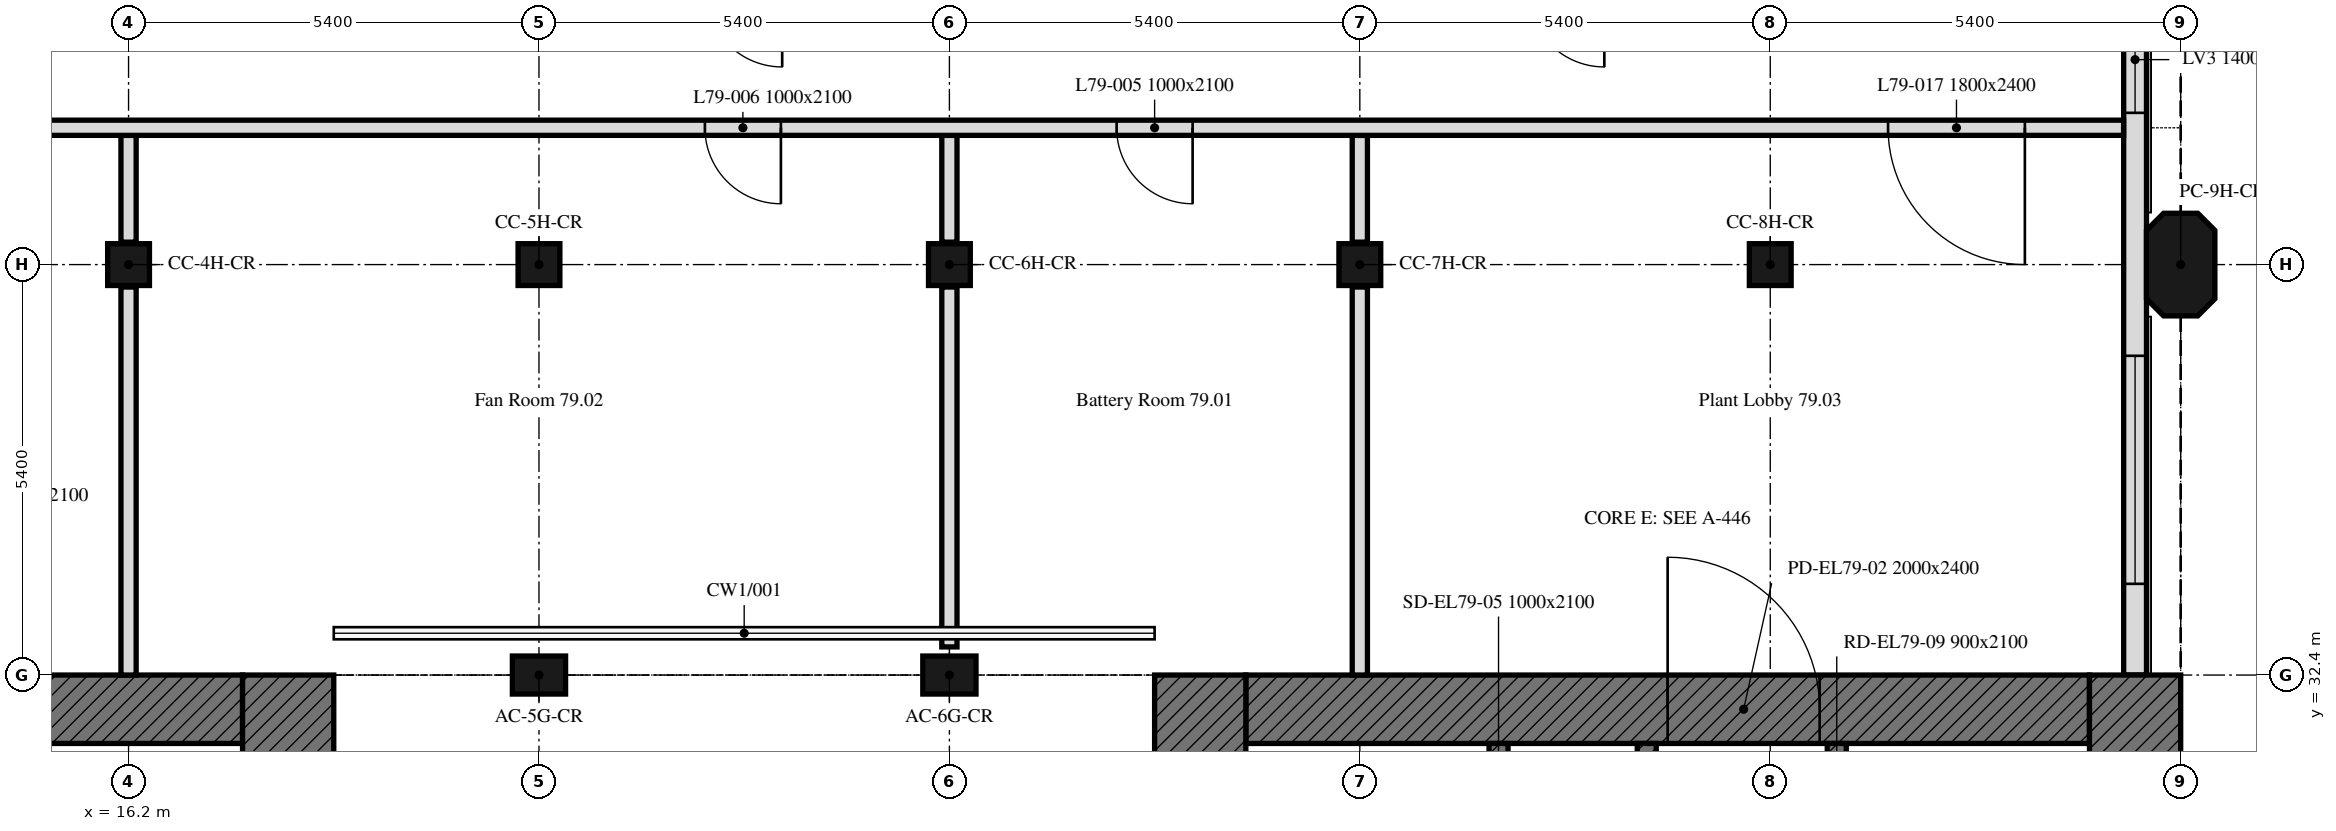
"""IFC4 building model, lengths in metres.
Left out: names, types, materials, properties, quantities, classifications, styles, units other than length and angle.
Written with IfcOpenShell. Run it as: python <this file> out.ifc"""

import sys

from ifc_helpers import new_model, si_unit, direction, frame, frame_2d, origin, origin_2d, place, context, subcontext, project, spatial, polyline, rectangle, outline, extrude, element, fill, save


model = new_model("IFC4")
c1 = context("Model", 3, precision=1e-05, world=origin(), true_north=direction((0.0, 1.0)))
c2 = subcontext(c1, "Body", "Model", "MODEL_VIEW")
j1 = project(units=[si_unit("LENGTHUNIT", "METRE"), si_unit("PLANEANGLEUNIT", "RADIAN")], contexts=[c1])
p1 = place(None, origin())
s1 = spatial("IfcSite", under=j1, at=p1, CompositionType="ELEMENT")
p2 = place(p1, origin())
s2 = spatial("IfcBuilding", under=s1, at=p2, CompositionType="ELEMENT")
p3 = place(p2, frame((0.0, 0.0, 317.2)))
s3 = spatial("IfcBuildingStorey", under=s2, at=p3, CompositionType="ELEMENT", Elevation=317.2)
for number, where, z_axis, x_axis in (
    (1, (21.6, 32.4, 0.0), (0.0, 0.0, 1.0), (1.0, 0.0, 0.0)),
    (2, (27.0, 32.4, 0.0), (0.0, 0.0, 1.0), (1.0, 0.0, 0.0)),
):
    element("IfcColumn", number, at=place(p3, frame(where, z_axis=z_axis, x_axis=x_axis)), inside=s3, PredefinedType="COLUMN", context=c2, shape_type="SweptSolid", body=[
        extrude(rectangle(XDim=0.7, YDim=0.5, at=origin_2d()), origin(), (0.0, 0.0, 1.0), 4.2),
    ])
for number, where, z_axis, x_axis in (
    (3, (16.2, 37.8, 0.0), (0.0, 0.0, 1.0), (1.0, 0.0, 0.0)),
    (4, (21.6, 37.8, 0.0), (0.0, 0.0, 1.0), (1.0, 0.0, 0.0)),
    (5, (27.0, 37.8, 0.0), (0.0, 0.0, 1.0), (1.0, 0.0, 0.0)),
    (6, (32.4, 37.8, 0.0), (0.0, 0.0, 1.0), (1.0, 0.0, 0.0)),
    (7, (37.8, 37.8, 0.0), (0.0, 0.0, 1.0), (1.0, 0.0, 0.0)),
):
    element("IfcColumn", number, at=place(p3, frame(where, z_axis=z_axis, x_axis=x_axis)), inside=s3, PredefinedType="COLUMN", context=c2, shape_type="SweptSolid", body=[
        extrude(rectangle(XDim=0.55, YDim=0.55, at=origin_2d()), origin(), (0.0, 0.0, 1.0), 4.2),
    ])
p4 = place(p3, frame((43.2, 37.8, 0.0), z_axis=(0.0, 0.0, 1.0), x_axis=(0.0, 1.0, 0.0)))
e8 = element("IfcColumn", 8, at=p4, inside=s3, PredefinedType="COLUMN", context=c2, shape_type="SweptSolid", body=[
    extrude(outline(polyline([(-0.45, -0.45), (0.45, -0.45), (0.675, -0.225), (0.675, 0.225), (0.45, 0.45), (-0.45, 0.45), (-0.675, 0.225), (-0.675, -0.225), (-0.45, -0.45)])), origin(), (0.0, 0.0, 1.0), 4.2),
])
p5 = place(p3, frame((42.6, 32.4, 0.0), z_axis=(0.0, 0.0, 1.0), x_axis=(0.0, 1.0, 0.0)))
e9 = element("IfcWall", 9, at=p5, inside=s3, PredefinedType="SOLIDWALL", context=c2, shape_type="SweptSolid", body=[
    extrude(outline(polyline([(0.0, 0.0), (10.614, 0.0), (10.614, 4.2), (10.024, 4.2), (9.434, 4.2), (8.845, 4.2), (8.255, 4.2), (7.665, 4.2), (7.076, 4.2), (6.486, 4.2), (5.896, 4.2), (5.307, 4.2), (4.717, 4.2), (4.127, 4.2), (3.538, 4.2), (2.948, 4.2), (2.359, 4.2), (1.769, 4.2), (1.179, 4.2), (0.59, 4.2), (0.0, 4.2), (0.0, 0.0)])), frame((0.0, 0.15, 0.0), z_axis=(0.0, -1.0, 0.0), x_axis=(1.0, 0.0, 0.0)), (0.0, 0.0, 1.0), 0.3),
])
p6 = place(p5, frame((1.2, 0.0, 0.6)))
e10 = element("IfcOpeningElement", 10, at=p6, cuts=e9, PredefinedType="OPENING", context=c2, shape_type="SweptSolid", body=[
    extrude(rectangle(XDim=3.0, YDim=1.8, at=frame_2d((1.5, 0.9))), frame((0.0, 0.16, 0.0), z_axis=(0.0, -1.0, 0.0), x_axis=(1.0, 0.0, 0.0)), (0.0, 0.0, 1.0), 0.32),
])
p7 = place(p5, frame((7.396, 0.0, 0.6)))
e11 = element("IfcOpeningElement", 11, at=p7, cuts=e9, PredefinedType="OPENING", context=c2, shape_type="SweptSolid", body=[
    extrude(rectangle(XDim=1.4, YDim=1.8, at=frame_2d((0.7, 0.9))), frame((0.0, 0.16, 0.0), z_axis=(0.0, -1.0, 0.0), x_axis=(1.0, 0.0, 0.0)), (0.0, 0.0, 1.0), 0.32),
])
p8 = place(p3, frame((6.6, 31.95, 0.0), z_axis=(0.0, 0.0, 1.0), x_axis=(1.0, 0.0, 0.0)))
e12 = element("IfcWall", 12, at=p8, inside=s3, PredefinedType="SOLIDWALL", context=c2, shape_type="SweptSolid", body=[
    extrude(rectangle(XDim=11.1, YDim=0.9, at=frame_2d((5.55, 0.0))), origin(), (0.0, 0.0, 1.0), 4.2),
])
p9 = place(p8, frame((3.55, 0.0, 0.0)))
e13 = element("IfcOpeningElement", 13, at=p9, cuts=e12, PredefinedType="OPENING", context=c2, shape_type="SweptSolid", body=[
    extrude(rectangle(XDim=2.0, YDim=2.4, at=frame_2d((1.0, 1.2))), frame((0.0, 0.45, 0.0), z_axis=(0.0, -1.0, 0.0), x_axis=(1.0, 0.0, 0.0)), (0.0, 0.0, 1.0), 0.9),
])
p10 = place(p3, frame((18.3, 32.4, 0.0), z_axis=(0.0, 0.0, 1.0), x_axis=(0.0, -1.0, 0.0)))
e14 = element("IfcWall", 14, at=p10, inside=s3, PredefinedType="SOLIDWALL", context=c2, shape_type="SweptSolid", body=[
    extrude(rectangle(XDim=16.2, YDim=1.2, at=frame_2d((8.1, 0.0))), origin(), (0.0, 0.0, 1.0), 4.2),
])
p11 = place(p3, frame((30.9, 31.95, 0.0), z_axis=(0.0, 0.0, 1.0), x_axis=(1.0, 0.0, 0.0)))
e15 = element("IfcWall", 15, at=p11, inside=s3, PredefinedType="SOLIDWALL", context=c2, shape_type="SweptSolid", body=[
    extrude(rectangle(XDim=11.1, YDim=0.9, at=frame_2d((5.55, 0.0))), origin(), (0.0, 0.0, 1.0), 4.2),
])
p12 = place(p11, frame((5.55, 0.0, 0.0)))
e16 = element("IfcOpeningElement", 16, at=p12, cuts=e15, PredefinedType="OPENING", context=c2, shape_type="SweptSolid", body=[
    extrude(rectangle(XDim=2.0, YDim=2.4, at=frame_2d((1.0, 1.2))), frame((0.0, 0.45, 0.0), z_axis=(0.0, -1.0, 0.0), x_axis=(1.0, 0.0, 0.0)), (0.0, 0.0, 1.0), 0.9),
])
for number, where, z_axis, x_axis in (
    (17, (42.6, 32.4, 0.0), (0.0, 0.0, 1.0), (0.0, -1.0, 0.0)),
    (18, (30.3, 16.2, 0.0), (0.0, 0.0, 1.0), (0.0, 1.0, 0.0)),
):
    element("IfcWall", number, at=place(p3, frame(where, z_axis=z_axis, x_axis=x_axis)), inside=s3, PredefinedType="SOLIDWALL", context=c2, shape_type="SweptSolid", body=[
        extrude(rectangle(XDim=16.2, YDim=1.2, at=frame_2d((8.1, 0.0))), origin(), (0.0, 0.0, 1.0), 4.2),
    ])
p13 = place(p3, frame((38.675, 17.1, 0.0), z_axis=(0.0, 0.0, 1.0), x_axis=(0.0, 1.0, 0.0)))
e19 = element("IfcWall", 19, at=p13, inside=s3, PredefinedType="SOLIDWALL", context=c2, shape_type="SweptSolid", body=[
    extrude(rectangle(XDim=14.4, YDim=0.25, at=frame_2d((7.2, 0.0))), origin(), (0.0, 0.0, 1.0), 4.2),
])
p14 = place(p13, frame((4.6, 0.0, 0.0)))
e20 = element("IfcOpeningElement", 20, at=p14, cuts=e19, PredefinedType="OPENING", context=c2, shape_type="SweptSolid", body=[
    extrude(rectangle(XDim=1.0, YDim=2.1, at=frame_2d((0.5, 1.05))), frame((0.0, 0.125, 0.0), z_axis=(0.0, -1.0, 0.0), x_axis=(1.0, 0.0, 0.0)), (0.0, 0.0, 1.0), 0.25),
])
p15 = place(p13, frame((7.062, 0.0, 0.0)))
e21 = element("IfcOpeningElement", 21, at=p15, cuts=e19, PredefinedType="OPENING", context=c2, shape_type="SweptSolid", body=[
    extrude(rectangle(XDim=1.2, YDim=2.1, at=frame_2d((0.6, 1.05))), frame((0.0, 0.125, 0.0), z_axis=(0.0, -1.0, 0.0), x_axis=(1.0, 0.0, 0.0)), (0.0, 0.0, 1.0), 0.25),
])
p16 = place(p13, frame((10.41, 0.0, 0.0)))
e22 = element("IfcOpeningElement", 22, at=p16, cuts=e19, PredefinedType="OPENING", context=c2, shape_type="SweptSolid", body=[
    extrude(rectangle(XDim=0.9, YDim=2.1, at=frame_2d((0.45, 1.05))), frame((0.0, 0.125, 0.0), z_axis=(0.0, -1.0, 0.0), x_axis=(1.0, 0.0, 0.0)), (0.0, 0.0, 1.0), 0.25),
])
p17 = place(p13, frame((13.023, 0.0, 0.0)))
e23 = element("IfcOpeningElement", 23, at=p17, cuts=e19, PredefinedType="OPENING", context=c2, shape_type="SweptSolid", body=[
    extrude(rectangle(XDim=0.9, YDim=2.1, at=frame_2d((0.45, 1.05))), frame((0.0, 0.125, 0.0), z_axis=(0.0, -1.0, 0.0), x_axis=(1.0, 0.0, 0.0)), (0.0, 0.0, 1.0), 0.25),
])
p18 = place(p3, frame((34.225, 17.1, 0.0), z_axis=(0.0, 0.0, 1.0), x_axis=(0.0, 1.0, 0.0)))
e24 = element("IfcWall", 24, at=p18, inside=s3, PredefinedType="SOLIDWALL", context=c2, shape_type="SweptSolid", body=[
    extrude(rectangle(XDim=14.4, YDim=0.25, at=frame_2d((7.2, 0.0))), origin(), (0.0, 0.0, 1.0), 4.2),
])
p19 = place(p18, frame((13.15, 0.0, 0.0)))
e25 = element("IfcOpeningElement", 25, at=p19, cuts=e24, PredefinedType="OPENING", context=c2, shape_type="SweptSolid", body=[
    extrude(rectangle(XDim=1.0, YDim=2.1, at=frame_2d((0.5, 1.05))), frame((0.0, 0.125, 0.0), z_axis=(0.0, -1.0, 0.0), x_axis=(1.0, 0.0, 0.0)), (0.0, 0.0, 1.0), 0.25),
])
p20 = place(p18, frame((0.482, 0.0, 0.0)))
e26 = element("IfcOpeningElement", 26, at=p20, cuts=e24, PredefinedType="OPENING", context=c2, shape_type="SweptSolid", body=[
    extrude(rectangle(XDim=0.9, YDim=2.1, at=frame_2d((0.45, 1.05))), frame((0.0, 0.125, 0.0), z_axis=(0.0, -1.0, 0.0), x_axis=(1.0, 0.0, 0.0)), (0.0, 0.0, 1.0), 0.25),
])
p21 = place(p18, frame((2.218, 0.0, 0.0)))
e27 = element("IfcOpeningElement", 27, at=p21, cuts=e24, PredefinedType="OPENING", context=c2, shape_type="SweptSolid", body=[
    extrude(rectangle(XDim=0.9, YDim=2.1, at=frame_2d((0.45, 1.05))), frame((0.0, 0.125, 0.0), z_axis=(0.0, -1.0, 0.0), x_axis=(1.0, 0.0, 0.0)), (0.0, 0.0, 1.0), 0.25),
])
p22 = place(p18, frame((3.71, 0.0, 0.0)))
e28 = element("IfcOpeningElement", 28, at=p22, cuts=e24, PredefinedType="OPENING", context=c2, shape_type="SweptSolid", body=[
    extrude(rectangle(XDim=0.9, YDim=2.1, at=frame_2d((0.45, 1.05))), frame((0.0, 0.125, 0.0), z_axis=(0.0, -1.0, 0.0), x_axis=(1.0, 0.0, 0.0)), (0.0, 0.0, 1.0), 0.25),
])
p23 = place(p18, frame((6.175, 0.0, 0.0)))
e29 = element("IfcOpeningElement", 29, at=p23, cuts=e24, PredefinedType="OPENING", context=c2, shape_type="SweptSolid", body=[
    extrude(rectangle(XDim=0.9, YDim=2.1, at=frame_2d((0.45, 1.05))), frame((0.0, 0.125, 0.0), z_axis=(0.0, -1.0, 0.0), x_axis=(1.0, 0.0, 0.0)), (0.0, 0.0, 1.0), 0.25),
])
p24 = place(p3, frame((36.175, 29.4, 0.0), z_axis=(0.0, 0.0, 1.0), x_axis=(0.0, 1.0, 0.0)))
e30 = element("IfcWall", 30, at=p24, inside=s3, PredefinedType="SOLIDWALL", context=c2, shape_type="SweptSolid", body=[
    extrude(rectangle(XDim=2.1, YDim=0.25, at=frame_2d((1.05, 0.0))), origin(), (0.0, 0.0, 1.0), 4.2),
])
p25 = place(p24, frame((0.5, 0.0, 0.0)))
e31 = element("IfcOpeningElement", 31, at=p25, cuts=e30, PredefinedType="OPENING", context=c2, shape_type="SweptSolid", body=[
    extrude(rectangle(XDim=1.0, YDim=2.1, at=frame_2d((0.5, 1.05))), frame((0.0, 0.125, 0.0), z_axis=(0.0, -1.0, 0.0), x_axis=(1.0, 0.0, 0.0)), (0.0, 0.0, 1.0), 0.25),
])
p26 = place(p3, frame((32.4, 32.4, 0.0), z_axis=(0.0, 0.0, 1.0), x_axis=(0.0, 1.0, 0.0)))
e32 = element("IfcWall", 32, at=p26, inside=s3, PredefinedType="PARTITIONING", context=c2, shape_type="SweptSolid", body=[
    extrude(rectangle(XDim=5.105, YDim=0.2, at=frame_2d((2.552, 0.0))), origin(), (0.0, 0.0, 1.0), 3.45),
])
for number, where, z_axis, x_axis in (
    (33, (32.4, 38.095, 0.0), (0.0, 0.0, 1.0), (0.0, 1.0, 0.0)),
    (34, (27.0, 39.5, 0.0), (0.0, 0.0, 1.0), (0.0, -1.0, 0.0)),
):
    element("IfcWall", number, at=place(p3, frame(where, z_axis=z_axis, x_axis=x_axis)), inside=s3, PredefinedType="PARTITIONING", context=c2, shape_type="SweptSolid", body=[
        extrude(rectangle(XDim=1.405, YDim=0.2, at=frame_2d((0.703, 0.0))), origin(), (0.0, 0.0, 1.0), 3.45),
    ])
p27 = place(p3, frame((27.0, 37.505, 0.0), z_axis=(0.0, 0.0, 1.0), x_axis=(0.0, -1.0, 0.0)))
e35 = element("IfcWall", 35, at=p27, inside=s3, PredefinedType="PARTITIONING", context=c2, shape_type="SweptSolid", body=[
    extrude(rectangle(XDim=4.735, YDim=0.2, at=frame_2d((2.367, 0.0))), origin(), (0.0, 0.0, 1.0), 3.45),
])
p28 = place(p3, frame((16.2, 39.5, 0.0), z_axis=(0.0, 0.0, 1.0), x_axis=(0.0, -1.0, 0.0)))
e36 = element("IfcWall", 36, at=p28, inside=s3, PredefinedType="PARTITIONING", context=c2, shape_type="SweptSolid", body=[
    extrude(rectangle(XDim=1.405, YDim=0.2, at=frame_2d((0.703, 0.0))), origin(), (0.0, 0.0, 1.0), 3.45),
])
p29 = place(p3, frame((16.2, 37.505, 0.0), z_axis=(0.0, 0.0, 1.0), x_axis=(0.0, -1.0, 0.0)))
e37 = element("IfcWall", 37, at=p29, inside=s3, PredefinedType="PARTITIONING", context=c2, shape_type="SweptSolid", body=[
    extrude(rectangle(XDim=5.105, YDim=0.2, at=frame_2d((2.552, 0.0))), origin(), (0.0, 0.0, 1.0), 3.45),
])
p30 = place(p3, frame((42.449, 39.6, 0.0), z_axis=(0.0, 0.0, 1.0), x_axis=(-1.0, 0.0, 0.0)))
e38 = element("IfcWall", 38, at=p30, inside=s3, PredefinedType="PARTITIONING", context=c2, shape_type="SweptSolid", body=[
    extrude(rectangle(XDim=37.149, YDim=0.2, at=frame_2d((18.574, 0.0))), origin(), (0.0, 0.0, 1.0), 3.45),
])
p31 = place(p30, frame((12.249, 0.0, 0.0)))
e39 = element("IfcOpeningElement", 39, at=p31, cuts=e38, PredefinedType="OPENING", context=c2, shape_type="SweptSolid", body=[
    extrude(rectangle(XDim=1.0, YDim=2.1, at=frame_2d((0.5, 1.05))), frame((0.0, 0.1, 0.0), z_axis=(0.0, -1.0, 0.0), x_axis=(1.0, 0.0, 0.0)), (0.0, 0.0, 1.0), 0.2),
])
p32 = place(p30, frame((17.666, 0.0, 0.0)))
e40 = element("IfcOpeningElement", 40, at=p32, cuts=e38, PredefinedType="OPENING", context=c2, shape_type="SweptSolid", body=[
    extrude(rectangle(XDim=1.0, YDim=2.1, at=frame_2d((0.5, 1.05))), frame((0.0, 0.1, 0.0), z_axis=(0.0, -1.0, 0.0), x_axis=(1.0, 0.0, 0.0)), (0.0, 0.0, 1.0), 0.2),
])
p33 = place(p30, frame((1.299, 0.0, 0.0)))
e41 = element("IfcOpeningElement", 41, at=p33, cuts=e38, PredefinedType="OPENING", context=c2, shape_type="SweptSolid", body=[
    extrude(rectangle(XDim=1.8, YDim=2.4, at=frame_2d((0.9, 1.2))), frame((0.0, 0.1, 0.0), z_axis=(0.0, -1.0, 0.0), x_axis=(1.0, 0.0, 0.0)), (0.0, 0.0, 1.0), 0.2),
])
p34 = place(p30, frame((28.299, 0.0, 0.0)))
e42 = element("IfcOpeningElement", 42, at=p34, cuts=e38, PredefinedType="OPENING", context=c2, shape_type="SweptSolid", body=[
    extrude(rectangle(XDim=1.8, YDim=2.4, at=frame_2d((0.9, 1.2))), frame((0.0, 0.1, 0.0), z_axis=(0.0, -1.0, 0.0), x_axis=(1.0, 0.0, 0.0)), (0.0, 0.0, 1.0), 0.2),
])
p35 = place(p6, origin())
e43 = element("IfcWindow", 43, at=p35, inside=s3, PartitioningType="SINGLE_PANEL", PredefinedType="WINDOW", context=c2, shape_type="SweptSolid", body=[
    extrude(rectangle(XDim=3.0, YDim=1.8, at=frame_2d((1.5, 0.9))), frame((0.0, 0.03, 0.0), z_axis=(0.0, -1.0, 0.0), x_axis=(1.0, 0.0, 0.0)), (0.0, 0.0, 1.0), 0.06),
])
fill(e10, e43)
p36 = place(p7, origin())
e44 = element("IfcWindow", 44, at=p36, inside=s3, PartitioningType="SINGLE_PANEL", PredefinedType="WINDOW", context=c2, shape_type="SweptSolid", body=[
    extrude(rectangle(XDim=1.4, YDim=1.8, at=frame_2d((0.7, 0.9))), frame((0.0, 0.03, 0.0), z_axis=(0.0, -1.0, 0.0), x_axis=(1.0, 0.0, 0.0)), (0.0, 0.0, 1.0), 0.06),
])
fill(e11, e44)
p37 = place(p12, origin())
e45 = element("IfcDoor", 45, at=p37, inside=s3, OperationType="DOUBLE_DOOR_SINGLE_SWING", PredefinedType="DOOR", context=c2, shape_type="SweptSolid", body=[
    extrude(rectangle(XDim=2.0, YDim=2.4, at=frame_2d((1.0, 1.2))), frame((0.0, 0.025, 0.0), z_axis=(0.0, -1.0, 0.0), x_axis=(1.0, 0.0, 0.0)), (0.0, 0.0, 1.0), 0.05),
])
fill(e16, e45)
p38 = place(p31, origin())
e46 = element("IfcDoor", 46, at=p38, inside=s3, OperationType="SINGLE_SWING_RIGHT", PredefinedType="DOOR", context=c2, shape_type="SweptSolid", body=[
    extrude(rectangle(XDim=1.0, YDim=2.1, at=frame_2d((0.5, 1.05))), frame((0.0, 0.025, 0.0), z_axis=(0.0, -1.0, 0.0), x_axis=(1.0, 0.0, 0.0)), (0.0, 0.0, 1.0), 0.05),
])
fill(e39, e46)
p39 = place(p32, origin())
e47 = element("IfcDoor", 47, at=p39, inside=s3, OperationType="SINGLE_SWING_LEFT", PredefinedType="DOOR", context=c2, shape_type="SweptSolid", body=[
    extrude(rectangle(XDim=1.0, YDim=2.1, at=frame_2d((0.5, 1.05))), frame((0.0, 0.025, 0.0), z_axis=(0.0, -1.0, 0.0), x_axis=(1.0, 0.0, 0.0)), (0.0, 0.0, 1.0), 0.05),
])
fill(e40, e47)
p40 = place(p33, origin())
e48 = element("IfcDoor", 48, at=p40, inside=s3, OperationType="DOUBLE_DOOR_SINGLE_SWING", PredefinedType="DOOR", context=c2, shape_type="SweptSolid", body=[
    extrude(rectangle(XDim=1.8, YDim=2.4, at=frame_2d((0.9, 1.2))), frame((0.0, 0.025, 0.0), z_axis=(0.0, -1.0, 0.0), x_axis=(1.0, 0.0, 0.0)), (0.0, 0.0, 1.0), 0.05),
])
fill(e41, e48)
save(model, sys.argv[1])
